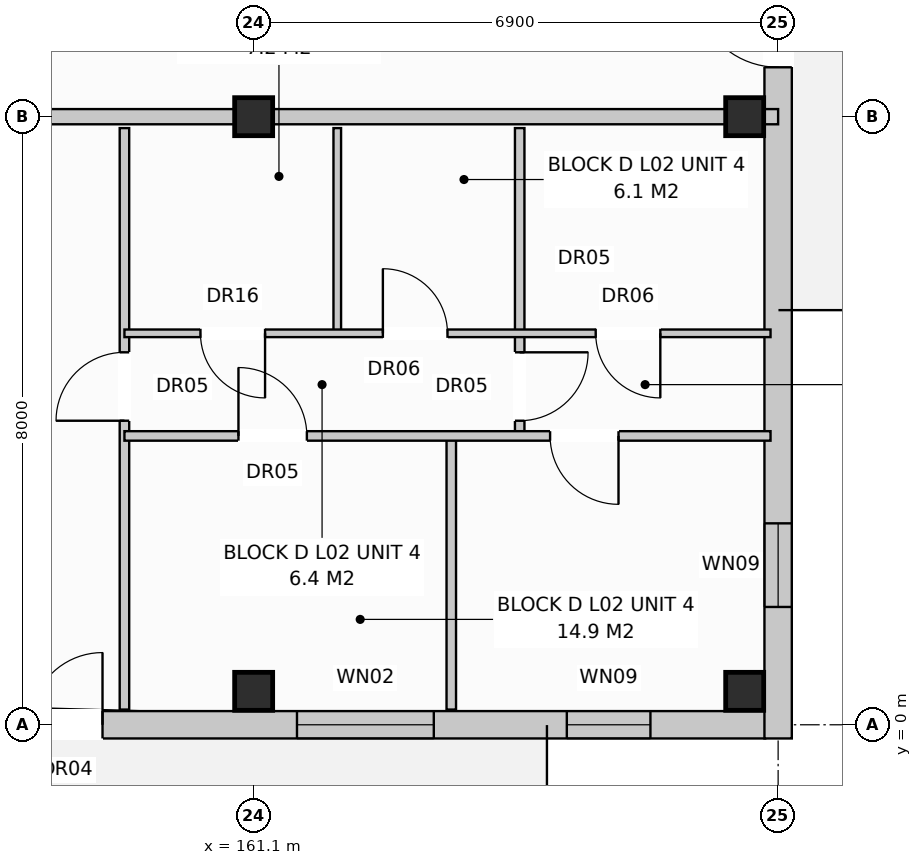
"""IFC4 building model, lengths in metres.
Left out: names, types, materials, properties, quantities, classifications, styles, units other than length and angle.
Written with IfcOpenShell. Run it as: python <this file> out.ifc"""

import sys

from ifc_helpers import new_model, si_unit, direction, frame, frame_2d, origin, origin_with_axes, origin_2d, place, context, subcontext, project, spatial, rectangle, extrude, element, fill, save


model = new_model("IFC4")
c1 = context("Model", 3, precision=1e-05, world=origin(), true_north=direction((0.0, 1.0)))
c2 = subcontext(c1, "Body", "Model", "MODEL_VIEW")
j1 = project(units=[si_unit("LENGTHUNIT", "METRE"), si_unit("PLANEANGLEUNIT", "RADIAN")], contexts=[c1])
p1 = place(None, origin())
s1 = spatial("IfcSite", under=j1, at=p1, CompositionType="ELEMENT")
p2 = place(p1, origin())
s2 = spatial("IfcBuilding", under=s1, at=p2, CompositionType="ELEMENT")
p3 = place(p2, frame((0.0, 0.0, 8.0)))
s3 = spatial("IfcBuildingStorey", under=s2, at=p3, CompositionType="ELEMENT", Elevation=8.0)
for number, where, z_axis, x_axis in (
    (1, (161.1, 0.44, 0.0), (0.0, 0.0, 1.0), (1.0, 0.0, 0.0)),
    (2, (161.1, 8.0, 0.0), (0.0, 0.0, 1.0), (1.0, 0.0, 0.0)),
    (3, (167.56, 0.44, 0.0), (0.0, 0.0, 1.0), (1.0, 0.0, 0.0)),
    (4, (167.56, 8.0, 0.0), (0.0, 0.0, 1.0), (1.0, 0.0, 0.0)),
):
    element("IfcColumn", number, at=place(p3, frame(where, z_axis=z_axis, x_axis=x_axis)), inside=s3, PredefinedType="COLUMN", context=c2, shape_type="SweptSolid", body=[
        extrude(rectangle(XDim=0.5, YDim=0.5, at=origin_2d()), origin(), (0.0, 0.0, 1.0), 3.2),
    ])
p4 = place(p3, frame((112.97, 0.0, 0.0), z_axis=(0.0, 0.0, 1.0), x_axis=(1.0, 0.0, 0.0)))
e5 = element("IfcWall", 5, at=p4, inside=s3, PredefinedType="STANDARD", context=c2, shape_type="SweptSolid", body=[
    extrude(rectangle(XDim=54.86, YDim=0.36, at=frame_2d((27.43, 0.0))), origin(), (0.0, 0.0, 1.0), 2.94),
])
p5 = place(p4, frame((2.788, 0.0, 0.0)))
e6 = element("IfcOpeningElement", 6, at=p5, cuts=e5, PredefinedType="OPENING", context=c2, shape_type="SweptSolid", body=[
    extrude(rectangle(XDim=0.95, YDim=2.1, at=frame_2d((0.475, 1.05))), frame((0.0, 0.192, 0.0), z_axis=(0.0, -1.0, 0.0), x_axis=(1.0, 0.0, 0.0)), (0.0, 0.0, 1.0), 0.384),
])
p6 = place(p4, frame((18.9, 0.0, 0.0)))
e7 = element("IfcOpeningElement", 7, at=p6, cuts=e5, PredefinedType="OPENING", context=c2, shape_type="SweptSolid", body=[
    extrude(rectangle(XDim=0.95, YDim=2.1, at=frame_2d((0.475, 1.05))), frame((0.0, 0.192, 0.0), z_axis=(0.0, -1.0, 0.0), x_axis=(1.0, 0.0, 0.0)), (0.0, 0.0, 1.0), 0.384),
])
p7 = place(p4, frame((30.792, 0.0, 0.0)))
e8 = element("IfcOpeningElement", 8, at=p7, cuts=e5, PredefinedType="OPENING", context=c2, shape_type="SweptSolid", body=[
    extrude(rectangle(XDim=0.95, YDim=2.1, at=frame_2d((0.475, 1.05))), frame((0.0, 0.192, 0.0), z_axis=(0.0, -1.0, 0.0), x_axis=(1.0, 0.0, 0.0)), (0.0, 0.0, 1.0), 0.384),
])
p8 = place(p4, frame((45.191, 0.0, 0.0)))
e9 = element("IfcOpeningElement", 9, at=p8, cuts=e5, PredefinedType="OPENING", context=c2, shape_type="SweptSolid", body=[
    extrude(rectangle(XDim=0.95, YDim=2.1, at=frame_2d((0.475, 1.05))), frame((0.0, 0.192, 0.0), z_axis=(0.0, -1.0, 0.0), x_axis=(1.0, 0.0, 0.0)), (0.0, 0.0, 1.0), 0.384),
])
p9 = place(p4, frame((0.645, 0.0, 0.8)))
e10 = element("IfcOpeningElement", 10, at=p9, cuts=e5, PredefinedType="OPENING", context=c2, shape_type="SweptSolid", body=[
    extrude(rectangle(XDim=1.8, YDim=1.7, at=frame_2d((0.9, 0.85))), frame((0.0, 0.192, 0.0), z_axis=(0.0, -1.0, 0.0), x_axis=(1.0, 0.0, 0.0)), (0.0, 0.0, 1.0), 0.384),
])
p10 = place(p4, frame((4.35, 0.0, 0.72)))
e11 = element("IfcOpeningElement", 11, at=p10, cuts=e5, PredefinedType="OPENING", context=c2, shape_type="SweptSolid", body=[
    extrude(rectangle(XDim=1.9, YDim=1.85, at=frame_2d((0.95, 0.925))), frame((0.0, 0.192, 0.0), z_axis=(0.0, -1.0, 0.0), x_axis=(1.0, 0.0, 0.0)), (0.0, 0.0, 1.0), 0.384),
])
p11 = place(p4, frame((10.45, 0.0, 0.72)))
e12 = element("IfcOpeningElement", 12, at=p11, cuts=e5, PredefinedType="OPENING", context=c2, shape_type="SweptSolid", body=[
    extrude(rectangle(XDim=1.1, YDim=1.5, at=frame_2d((0.55, 0.75))), frame((0.0, 0.192, 0.0), z_axis=(0.0, -1.0, 0.0), x_axis=(1.0, 0.0, 0.0)), (0.0, 0.0, 1.0), 0.384),
])
p12 = place(p4, frame((15.05, 0.0, 0.72)))
e13 = element("IfcOpeningElement", 13, at=p12, cuts=e5, PredefinedType="OPENING", context=c2, shape_type="SweptSolid", body=[
    extrude(rectangle(XDim=1.1, YDim=1.5, at=frame_2d((0.55, 0.75))), frame((0.0, 0.192, 0.0), z_axis=(0.0, -1.0, 0.0), x_axis=(1.0, 0.0, 0.0)), (0.0, 0.0, 1.0), 0.384),
])
p13 = place(p4, frame((22.75, 0.0, 0.8)))
e14 = element("IfcOpeningElement", 14, at=p13, cuts=e5, PredefinedType="OPENING", context=c2, shape_type="SweptSolid", body=[
    extrude(rectangle(XDim=1.9, YDim=1.85, at=frame_2d((0.95, 0.925))), frame((0.0, 0.192, 0.0), z_axis=(0.0, -1.0, 0.0), x_axis=(1.0, 0.0, 0.0)), (0.0, 0.0, 1.0), 0.384),
])
p14 = place(p4, frame((28.85, 0.0, 0.72)))
e15 = element("IfcOpeningElement", 15, at=p14, cuts=e5, PredefinedType="OPENING", context=c2, shape_type="SweptSolid", body=[
    extrude(rectangle(XDim=1.1, YDim=1.5, at=frame_2d((0.55, 0.75))), frame((0.0, 0.192, 0.0), z_axis=(0.0, -1.0, 0.0), x_axis=(1.0, 0.0, 0.0)), (0.0, 0.0, 1.0), 0.384),
])
p15 = place(p4, frame((34.9, 0.0, 0.8)))
e16 = element("IfcOpeningElement", 16, at=p15, cuts=e5, PredefinedType="OPENING", context=c2, shape_type="SweptSolid", body=[
    extrude(rectangle(XDim=1.8, YDim=1.7, at=frame_2d((0.9, 0.85))), frame((0.0, 0.192, 0.0), z_axis=(0.0, -1.0, 0.0), x_axis=(1.0, 0.0, 0.0)), (0.0, 0.0, 1.0), 0.384),
])
p16 = place(p4, frame((38.65, 0.0, 0.72)))
e17 = element("IfcOpeningElement", 17, at=p16, cuts=e5, PredefinedType="OPENING", context=c2, shape_type="SweptSolid", body=[
    extrude(rectangle(XDim=1.1, YDim=1.5, at=frame_2d((0.55, 0.75))), frame((0.0, 0.192, 0.0), z_axis=(0.0, -1.0, 0.0), x_axis=(1.0, 0.0, 0.0)), (0.0, 0.0, 1.0), 0.384),
])
p17 = place(p4, frame((43.35, 0.0, 0.72)))
e18 = element("IfcOpeningElement", 18, at=p17, cuts=e5, PredefinedType="OPENING", context=c2, shape_type="SweptSolid", body=[
    extrude(rectangle(XDim=1.1, YDim=1.5, at=frame_2d((0.55, 0.75))), frame((0.0, 0.192, 0.0), z_axis=(0.0, -1.0, 0.0), x_axis=(1.0, 0.0, 0.0)), (0.0, 0.0, 1.0), 0.384),
])
p18 = place(p4, frame((48.7, 0.0, 0.8)))
e19 = element("IfcOpeningElement", 19, at=p18, cuts=e5, PredefinedType="OPENING", context=c2, shape_type="SweptSolid", body=[
    extrude(rectangle(XDim=1.8, YDim=1.7, at=frame_2d((0.9, 0.85))), frame((0.0, 0.192, 0.0), z_axis=(0.0, -1.0, 0.0), x_axis=(1.0, 0.0, 0.0)), (0.0, 0.0, 1.0), 0.384),
])
p19 = place(p4, frame((52.25, 0.0, 0.72)))
e20 = element("IfcOpeningElement", 20, at=p19, cuts=e5, PredefinedType="OPENING", context=c2, shape_type="SweptSolid", body=[
    extrude(rectangle(XDim=1.1, YDim=1.5, at=frame_2d((0.55, 0.75))), frame((0.0, 0.192, 0.0), z_axis=(0.0, -1.0, 0.0), x_axis=(1.0, 0.0, 0.0)), (0.0, 0.0, 1.0), 0.384),
])
p20 = place(p3, frame((168.0, -0.18, 0.0), z_axis=(0.0, 0.0, 1.0), x_axis=(0.0, 1.0, 0.0)))
e21 = element("IfcWall", 21, at=p20, inside=s3, PredefinedType="STANDARD", context=c2, shape_type="SweptSolid", body=[
    extrude(rectangle(XDim=18.76, YDim=0.36, at=frame_2d((9.38, 0.0))), origin(), (0.0, 0.0, 1.0), 2.94),
])
p21 = place(p20, frame((8.83, 0.0, 0.0)))
e22 = element("IfcOpeningElement", 22, at=p21, cuts=e21, PredefinedType="OPENING", context=c2, shape_type="SweptSolid", body=[
    extrude(rectangle(XDim=1.1, YDim=2.1, at=frame_2d((0.55, 1.05))), frame((0.0, 0.192, 0.0), z_axis=(0.0, -1.0, 0.0), x_axis=(1.0, 0.0, 0.0)), (0.0, 0.0, 1.0), 0.384),
])
p22 = place(p20, frame((1.73, 0.0, 0.72)))
e23 = element("IfcOpeningElement", 23, at=p22, cuts=e21, PredefinedType="OPENING", context=c2, shape_type="SweptSolid", body=[
    extrude(rectangle(XDim=1.1, YDim=1.5, at=frame_2d((0.55, 0.75))), frame((0.0, 0.192, 0.0), z_axis=(0.0, -1.0, 0.0), x_axis=(1.0, 0.0, 0.0)), (0.0, 0.0, 1.0), 0.384),
])
p23 = place(p20, frame((15.93, 0.0, 0.72)))
e24 = element("IfcOpeningElement", 24, at=p23, cuts=e21, PredefinedType="OPENING", context=c2, shape_type="SweptSolid", body=[
    extrude(rectangle(XDim=1.1, YDim=1.5, at=frame_2d((0.55, 0.75))), frame((0.0, 0.192, 0.0), z_axis=(0.0, -1.0, 0.0), x_axis=(1.0, 0.0, 0.0)), (0.0, 0.0, 1.0), 0.384),
])
p24 = place(p3, frame((154.2, 8.0, 0.0), z_axis=(0.0, 0.0, 1.0), x_axis=(1.0, 0.0, 0.0)))
e25 = element("IfcWall", 25, at=p24, inside=s3, PredefinedType="PARTITIONING", context=c2, shape_type="SweptSolid", body=[
    extrude(rectangle(XDim=13.8, YDim=0.2, at=frame_2d((6.9, 0.0))), origin(), (0.0, 0.0, 1.0), 2.38),
])
p25 = place(p24, frame((2.4, 0.0, 0.0)))
e26 = element("IfcOpeningElement", 26, at=p25, cuts=e25, PredefinedType="OPENING", context=c2, shape_type="SweptSolid", body=[
    extrude(rectangle(XDim=0.95, YDim=2.15, at=frame_2d((0.475, 1.075))), frame((0.0, 0.112, 0.0), z_axis=(0.0, -1.0, 0.0), x_axis=(1.0, 0.0, 0.0)), (0.0, 0.0, 1.0), 0.224),
])
p26 = place(p3, frame((159.4, 7.85, 0.0), z_axis=(0.0, 0.0, 1.0), x_axis=(0.0, -1.0, 0.0)))
e27 = element("IfcWall", 27, at=p26, inside=s3, PredefinedType="PARTITIONING", context=c2, shape_type="SweptSolid", body=[
    extrude(rectangle(XDim=7.65, YDim=0.125, at=frame_2d((3.825, 0.0))), origin(), (0.0, 0.0, 1.0), 2.94),
])
p27 = place(p26, frame((2.95, 0.0, 0.0)))
e28 = element("IfcOpeningElement", 28, at=p27, cuts=e27, PredefinedType="OPENING", context=c2, shape_type="SweptSolid", body=[
    extrude(rectangle(XDim=0.9, YDim=2.1, at=frame_2d((0.45, 1.05))), frame((0.0, 0.074, 0.0), z_axis=(0.0, -1.0, 0.0), x_axis=(1.0, 0.0, 0.0)), (0.0, 0.0, 1.0), 0.149),
])
p28 = place(p3, frame((162.2, 7.85, 0.0), z_axis=(0.0, 0.0, 1.0), x_axis=(0.0, -1.0, 0.0)))
e29 = element("IfcWall", 29, at=p28, inside=s3, PredefinedType="PARTITIONING", context=c2, shape_type="SweptSolid", body=[
    extrude(rectangle(XDim=2.7, YDim=0.1, at=frame_2d((1.35, 0.0))), origin(), (0.0, 0.0, 1.0), 2.94),
])
p29 = place(p3, frame((164.6, 7.85, 0.0), z_axis=(0.0, 0.0, 1.0), x_axis=(0.0, -1.0, 0.0)))
e30 = element("IfcWall", 30, at=p29, inside=s3, PredefinedType="PARTITIONING", context=c2, shape_type="SweptSolid", body=[
    extrude(rectangle(XDim=4.05, YDim=0.125, at=frame_2d((2.025, 0.0))), origin(), (0.0, 0.0, 1.0), 2.94),
])
p30 = place(p29, frame((2.95, 0.0, 0.0)))
e31 = element("IfcOpeningElement", 31, at=p30, cuts=e30, PredefinedType="OPENING", context=c2, shape_type="SweptSolid", body=[
    extrude(rectangle(XDim=0.9, YDim=2.1, at=frame_2d((0.45, 1.05))), frame((0.0, 0.074, 0.0), z_axis=(0.0, -1.0, 0.0), x_axis=(1.0, 0.0, 0.0)), (0.0, 0.0, 1.0), 0.149),
])
p31 = place(p3, frame((163.7, 3.8, 0.0), z_axis=(0.0, 0.0, 1.0), x_axis=(0.0, -1.0, 0.0)))
e32 = element("IfcWall", 32, at=p31, inside=s3, PredefinedType="PARTITIONING", context=c2, shape_type="SweptSolid", body=[
    extrude(rectangle(XDim=3.6, YDim=0.125, at=frame_2d((1.8, 0.0))), origin(), (0.0, 0.0, 1.0), 2.94),
])
p32 = place(p3, frame((159.4, 5.15, 0.0), z_axis=(0.0, 0.0, 1.0), x_axis=(1.0, 0.0, 0.0)))
e33 = element("IfcWall", 33, at=p32, inside=s3, PredefinedType="PARTITIONING", context=c2, shape_type="SweptSolid", body=[
    extrude(rectangle(XDim=8.5, YDim=0.1, at=frame_2d((4.25, 0.0))), origin(), (0.0, 0.0, 1.0), 2.94),
])
p33 = place(p32, frame((1.0, 0.0, 0.0)))
e34 = element("IfcOpeningElement", 34, at=p33, cuts=e33, PredefinedType="OPENING", context=c2, shape_type="SweptSolid", body=[
    extrude(rectangle(XDim=0.85, YDim=2.1, at=frame_2d((0.425, 1.05))), frame((0.0, 0.062, 0.0), z_axis=(0.0, -1.0, 0.0), x_axis=(1.0, 0.0, 0.0)), (0.0, 0.0, 1.0), 0.124),
])
p34 = place(p32, frame((3.4, 0.0, 0.0)))
e35 = element("IfcOpeningElement", 35, at=p34, cuts=e33, PredefinedType="OPENING", context=c2, shape_type="SweptSolid", body=[
    extrude(rectangle(XDim=0.85, YDim=2.05, at=frame_2d((0.425, 1.025))), frame((0.0, 0.062, 0.0), z_axis=(0.0, -1.0, 0.0), x_axis=(1.0, 0.0, 0.0)), (0.0, 0.0, 1.0), 0.124),
])
p35 = place(p32, frame((6.2, 0.0, 0.0)))
e36 = element("IfcOpeningElement", 36, at=p35, cuts=e33, PredefinedType="OPENING", context=c2, shape_type="SweptSolid", body=[
    extrude(rectangle(XDim=0.85, YDim=2.05, at=frame_2d((0.425, 1.025))), frame((0.0, 0.062, 0.0), z_axis=(0.0, -1.0, 0.0), x_axis=(1.0, 0.0, 0.0)), (0.0, 0.0, 1.0), 0.124),
])
p36 = place(p3, frame((159.4, 3.8, 0.0), z_axis=(0.0, 0.0, 1.0), x_axis=(1.0, 0.0, 0.0)))
e37 = element("IfcWall", 37, at=p36, inside=s3, PredefinedType="PARTITIONING", context=c2, shape_type="SweptSolid", body=[
    extrude(rectangle(XDim=8.5, YDim=0.125, at=frame_2d((4.25, 0.0))), origin(), (0.0, 0.0, 1.0), 2.94),
])
p37 = place(p36, frame((1.5, 0.0, 0.0)))
e38 = element("IfcOpeningElement", 38, at=p37, cuts=e37, PredefinedType="OPENING", context=c2, shape_type="SweptSolid", body=[
    extrude(rectangle(XDim=0.9, YDim=2.1, at=frame_2d((0.45, 1.05))), frame((0.0, 0.074, 0.0), z_axis=(0.0, -1.0, 0.0), x_axis=(1.0, 0.0, 0.0)), (0.0, 0.0, 1.0), 0.149),
])
p38 = place(p36, frame((5.6, 0.0, 0.0)))
e39 = element("IfcOpeningElement", 39, at=p38, cuts=e37, PredefinedType="OPENING", context=c2, shape_type="SweptSolid", body=[
    extrude(rectangle(XDim=0.9, YDim=2.1, at=frame_2d((0.45, 1.05))), frame((0.0, 0.074, 0.0), z_axis=(0.0, -1.0, 0.0), x_axis=(1.0, 0.0, 0.0)), (0.0, 0.0, 1.0), 0.149),
])
p39 = place(p8, origin_with_axes())
e40 = element("IfcDoor", 40, at=p39, inside=s3, OperationType="SINGLE_SWING_RIGHT", PredefinedType="DOOR", context=c2, shape_type="SweptSolid", body=[
    extrude(rectangle(XDim=0.95, YDim=2.1, at=frame_2d((0.475, 1.05))), frame((0.0, 0.025, 0.0), z_axis=(0.0, -1.0, 0.0), x_axis=(1.0, 0.0, 0.0)), (0.0, 0.0, 1.0), 0.05),
])
fill(e9, e40)
p40 = place(p18, origin_with_axes())
e41 = element("IfcWindow", 41, at=p40, inside=s3, PartitioningType="SINGLE_PANEL", PredefinedType="WINDOW", context=c2, shape_type="SweptSolid", body=[
    extrude(rectangle(XDim=1.8, YDim=1.7, at=frame_2d((0.9, 0.85))), frame((0.0, 0.03, 0.0), z_axis=(0.0, -1.0, 0.0), x_axis=(1.0, 0.0, 0.0)), (0.0, 0.0, 1.0), 0.06),
])
fill(e19, e41)
p41 = place(p19, origin_with_axes())
e42 = element("IfcWindow", 42, at=p41, inside=s3, PartitioningType="SINGLE_PANEL", PredefinedType="WINDOW", context=c2, shape_type="SweptSolid", body=[
    extrude(rectangle(XDim=1.1, YDim=1.5, at=frame_2d((0.55, 0.75))), frame((0.0, 0.03, 0.0), z_axis=(0.0, -1.0, 0.0), x_axis=(1.0, 0.0, 0.0)), (0.0, 0.0, 1.0), 0.06),
])
fill(e20, e42)
p42 = place(p21, origin_with_axes())
e43 = element("IfcDoor", 43, at=p42, inside=s3, OperationType="SINGLE_SWING_RIGHT", PredefinedType="DOOR", context=c2, shape_type="SweptSolid", body=[
    extrude(rectangle(XDim=1.1, YDim=2.1, at=frame_2d((0.55, 1.05))), frame((0.0, 0.025, 0.0), z_axis=(0.0, -1.0, 0.0), x_axis=(1.0, 0.0, 0.0)), (0.0, 0.0, 1.0), 0.05),
])
fill(e22, e43)
p43 = place(p22, origin_with_axes())
e44 = element("IfcWindow", 44, at=p43, inside=s3, PartitioningType="SINGLE_PANEL", PredefinedType="WINDOW", context=c2, shape_type="SweptSolid", body=[
    extrude(rectangle(XDim=1.1, YDim=1.5, at=frame_2d((0.55, 0.75))), frame((0.0, 0.03, 0.0), z_axis=(0.0, -1.0, 0.0), x_axis=(1.0, 0.0, 0.0)), (0.0, 0.0, 1.0), 0.06),
])
fill(e23, e44)
p44 = place(p27, frame((0.9, 0.0, 0.0), z_axis=(0.0, 0.0, 1.0), x_axis=(-1.0, 0.0, 0.0)))
e45 = element("IfcDoor", 45, at=p44, inside=s3, OperationType="SINGLE_SWING_RIGHT", PredefinedType="DOOR", context=c2, shape_type="SweptSolid", body=[
    extrude(rectangle(XDim=0.9, YDim=2.1, at=frame_2d((0.45, 1.05))), frame((0.0, 0.025, 0.0), z_axis=(0.0, -1.0, 0.0), x_axis=(1.0, 0.0, 0.0)), (0.0, 0.0, 1.0), 0.05),
])
fill(e28, e45)
p45 = place(p30, origin_with_axes())
e46 = element("IfcDoor", 46, at=p45, inside=s3, OperationType="SINGLE_SWING_LEFT", PredefinedType="DOOR", context=c2, shape_type="SweptSolid", body=[
    extrude(rectangle(XDim=0.9, YDim=2.1, at=frame_2d((0.45, 1.05))), frame((0.0, 0.025, 0.0), z_axis=(0.0, -1.0, 0.0), x_axis=(1.0, 0.0, 0.0)), (0.0, 0.0, 1.0), 0.05),
])
fill(e31, e46)
p46 = place(p33, frame((0.85, 0.0, 0.0), z_axis=(0.0, 0.0, 1.0), x_axis=(-1.0, 0.0, 0.0)))
e47 = element("IfcDoor", 47, at=p46, inside=s3, OperationType="SINGLE_SWING_RIGHT", PredefinedType="DOOR", context=c2, shape_type="SweptSolid", body=[
    extrude(rectangle(XDim=0.85, YDim=2.1, at=frame_2d((0.425, 1.05))), frame((0.0, 0.025, 0.0), z_axis=(0.0, -1.0, 0.0), x_axis=(1.0, 0.0, 0.0)), (0.0, 0.0, 1.0), 0.05),
])
fill(e34, e47)
p47 = place(p34, origin_with_axes())
e48 = element("IfcDoor", 48, at=p47, inside=s3, OperationType="SINGLE_SWING_LEFT", PredefinedType="DOOR", context=c2, shape_type="SweptSolid", body=[
    extrude(rectangle(XDim=0.85, YDim=2.05, at=frame_2d((0.425, 1.025))), frame((0.0, 0.025, 0.0), z_axis=(0.0, -1.0, 0.0), x_axis=(1.0, 0.0, 0.0)), (0.0, 0.0, 1.0), 0.05),
])
fill(e35, e48)
p48 = place(p35, frame((0.85, 0.0, 0.0), z_axis=(0.0, 0.0, 1.0), x_axis=(-1.0, 0.0, 0.0)))
e49 = element("IfcDoor", 49, at=p48, inside=s3, OperationType="SINGLE_SWING_RIGHT", PredefinedType="DOOR", context=c2, shape_type="SweptSolid", body=[
    extrude(rectangle(XDim=0.85, YDim=2.05, at=frame_2d((0.425, 1.025))), frame((0.0, 0.025, 0.0), z_axis=(0.0, -1.0, 0.0), x_axis=(1.0, 0.0, 0.0)), (0.0, 0.0, 1.0), 0.05),
])
fill(e36, e49)
p49 = place(p37, origin_with_axes())
e50 = element("IfcDoor", 50, at=p49, inside=s3, OperationType="SINGLE_SWING_LEFT", PredefinedType="DOOR", context=c2, shape_type="SweptSolid", body=[
    extrude(rectangle(XDim=0.9, YDim=2.1, at=frame_2d((0.45, 1.05))), frame((0.0, 0.025, 0.0), z_axis=(0.0, -1.0, 0.0), x_axis=(1.0, 0.0, 0.0)), (0.0, 0.0, 1.0), 0.05),
])
fill(e38, e50)
p50 = place(p38, frame((0.9, 0.0, 0.0), z_axis=(0.0, 0.0, 1.0), x_axis=(-1.0, 0.0, 0.0)))
e51 = element("IfcDoor", 51, at=p50, inside=s3, OperationType="SINGLE_SWING_RIGHT", PredefinedType="DOOR", context=c2, shape_type="SweptSolid", body=[
    extrude(rectangle(XDim=0.9, YDim=2.1, at=frame_2d((0.45, 1.05))), frame((0.0, 0.025, 0.0), z_axis=(0.0, -1.0, 0.0), x_axis=(1.0, 0.0, 0.0)), (0.0, 0.0, 1.0), 0.05),
])
fill(e39, e51)
save(model, sys.argv[1])
